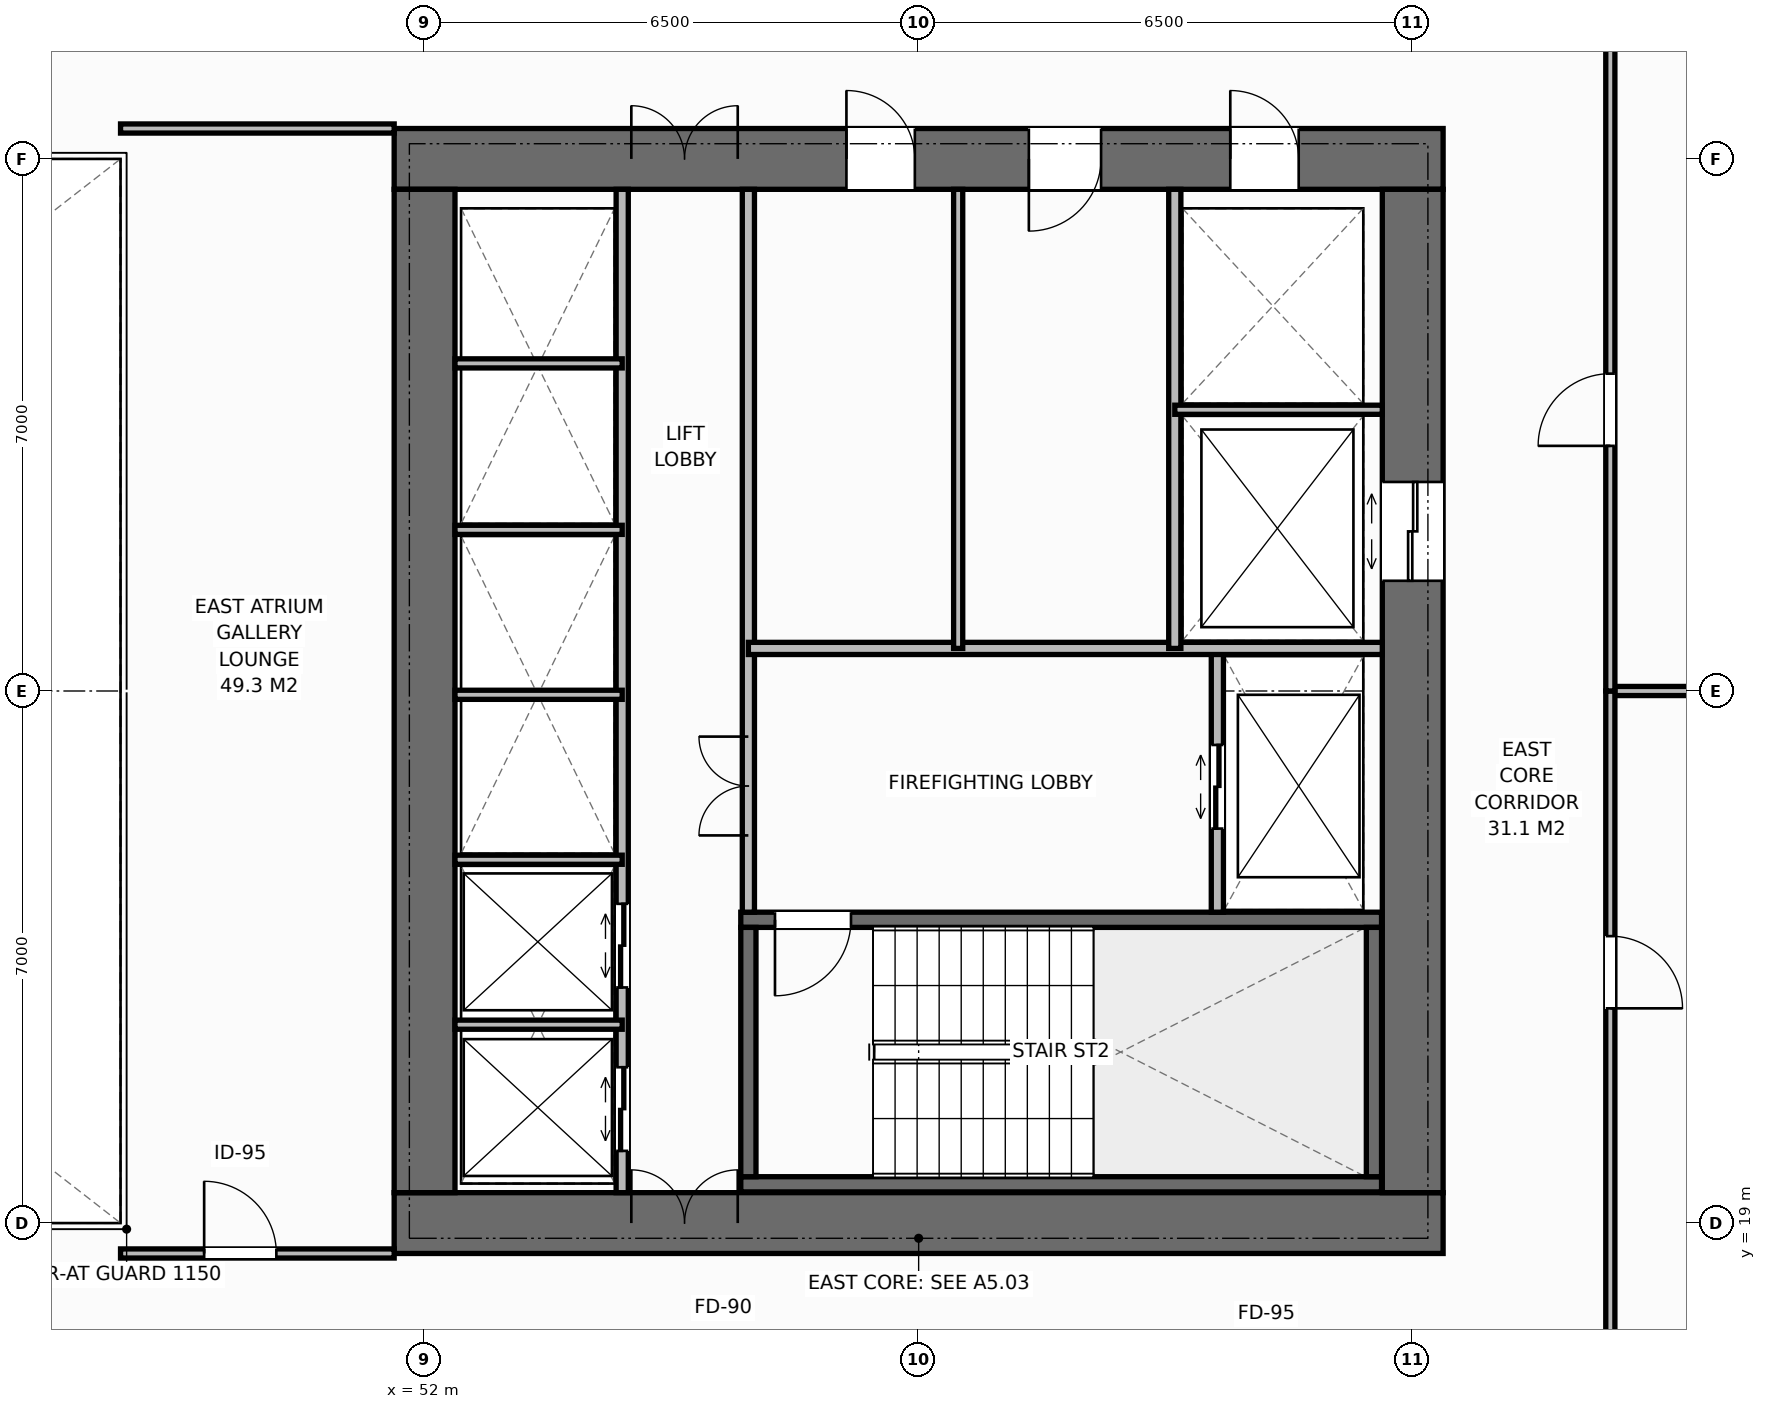
"""IFC4 building model, lengths in metres.
Left out: names, types, materials, properties, quantities, classifications, styles, units other than length and angle.
Written with IfcOpenShell. Run it as: python <this file> out.ifc"""

import sys

from ifc_helpers import new_model, si_unit, direction, frame, frame_2d, origin, place, context, subcontext, project, spatial, rectangle, extrude, element, fill, save


model = new_model("IFC4")
c1 = context("Model", 3, precision=1e-05, world=origin(), true_north=direction((0.0, 1.0)))
c2 = subcontext(c1, "Body", "Model", "MODEL_VIEW")
j1 = project(units=[si_unit("LENGTHUNIT", "METRE"), si_unit("PLANEANGLEUNIT", "RADIAN")], contexts=[c1])
p1 = place(None, origin())
s1 = spatial("IfcSite", under=j1, at=p1, CompositionType="ELEMENT")
p2 = place(p1, origin())
s2 = spatial("IfcBuilding", under=s1, at=p2, CompositionType="ELEMENT")
p3 = place(p2, frame((0.0, 0.0, 69.6)))
s3 = spatial("IfcBuildingStorey", under=s2, at=p3, CompositionType="ELEMENT", Elevation=69.6)
p4 = place(p3, frame((51.6, 19.0, 0.0), z_axis=(0.0, 0.0, 1.0), x_axis=(1.0, 0.0, 0.0)))
e1 = element("IfcWall", 1, at=p4, inside=s3, PredefinedType="SHEAR", context=c2, shape_type="SweptSolid", body=[
    extrude(rectangle(XDim=13.8, YDim=0.8, at=frame_2d((6.9, 0.0))), origin(), (0.0, 0.0, 1.0), 3.8),
])
p5 = place(p4, frame((3.12, 0.0, 0.0)))
e2 = element("IfcOpeningElement", 2, at=p5, cuts=e1, PredefinedType="OPENING", context=c2, shape_type="SweptSolid", body=[
    extrude(rectangle(XDim=1.4, YDim=2.2, at=frame_2d((0.7, 1.1))), frame((0.0, 0.41, 0.0), z_axis=(0.0, -1.0, 0.0), x_axis=(1.0, 0.0, 0.0)), (0.0, 0.0, 1.0), 0.82),
])
p6 = place(p3, frame((51.6, 33.0, 0.0), z_axis=(0.0, 0.0, 1.0), x_axis=(1.0, 0.0, 0.0)))
e3 = element("IfcWall", 3, at=p6, inside=s3, PredefinedType="SHEAR", context=c2, shape_type="SweptSolid", body=[
    extrude(rectangle(XDim=13.8, YDim=0.8, at=frame_2d((6.9, 0.0))), origin(), (0.0, 0.0, 1.0), 3.8),
])
p7 = place(p6, frame((3.12, 0.0, 0.0)))
e4 = element("IfcOpeningElement", 4, at=p7, cuts=e3, PredefinedType="OPENING", context=c2, shape_type="SweptSolid", body=[
    extrude(rectangle(XDim=1.4, YDim=2.2, at=frame_2d((0.7, 1.1))), frame((0.0, 0.41, 0.0), z_axis=(0.0, -1.0, 0.0), x_axis=(1.0, 0.0, 0.0)), (0.0, 0.0, 1.0), 0.82),
])
p8 = place(p6, frame((11.0, 0.0, 0.0)))
e5 = element("IfcOpeningElement", 5, at=p8, cuts=e3, PredefinedType="OPENING", context=c2, shape_type="SweptSolid", body=[
    extrude(rectangle(XDim=0.9, YDim=2.15, at=frame_2d((0.45, 1.075))), frame((0.0, 0.41, 0.0), z_axis=(0.0, -1.0, 0.0), x_axis=(1.0, 0.0, 0.0)), (0.0, 0.0, 1.0), 0.82),
])
p9 = place(p6, frame((5.95, 0.0, 0.0)))
e6 = element("IfcOpeningElement", 6, at=p9, cuts=e3, PredefinedType="OPENING", context=c2, shape_type="SweptSolid", body=[
    extrude(rectangle(XDim=0.9, YDim=2.15, at=frame_2d((0.45, 1.075))), frame((0.0, 0.41, 0.0), z_axis=(0.0, -1.0, 0.0), x_axis=(1.0, 0.0, 0.0)), (0.0, 0.0, 1.0), 0.82),
])
p10 = place(p6, frame((8.35, 0.0, 0.0)))
e7 = element("IfcOpeningElement", 7, at=p10, cuts=e3, PredefinedType="OPENING", context=c2, shape_type="SweptSolid", body=[
    extrude(rectangle(XDim=0.95, YDim=2.15, at=frame_2d((0.475, 1.075))), frame((0.0, 0.41, 0.0), z_axis=(0.0, -1.0, 0.0), x_axis=(1.0, 0.0, 0.0)), (0.0, 0.0, 1.0), 0.82),
])
p11 = place(p3, frame((52.0, 19.4, 0.0), z_axis=(0.0, 0.0, 1.0), x_axis=(0.0, 1.0, 0.0)))
e8 = element("IfcWall", 8, at=p11, inside=s3, PredefinedType="SHEAR", context=c2, shape_type="SweptSolid", body=[
    extrude(rectangle(XDim=13.2, YDim=0.8, at=frame_2d((6.6, 0.0))), origin(), (0.0, 0.0, 1.0), 3.8),
])
p12 = place(p3, frame((65.0, 19.4, 0.0), z_axis=(0.0, 0.0, 1.0), x_axis=(0.0, 1.0, 0.0)))
e9 = element("IfcWall", 9, at=p12, inside=s3, PredefinedType="SHEAR", context=c2, shape_type="SweptSolid", body=[
    extrude(rectangle(XDim=13.2, YDim=0.8, at=frame_2d((6.6, 0.0))), origin(), (0.0, 0.0, 1.0), 3.8),
])
p13 = place(p12, frame((8.05, 0.0, 0.0)))
e10 = element("IfcOpeningElement", 10, at=p13, cuts=e9, PredefinedType="OPENING", context=c2, shape_type="SweptSolid", body=[
    extrude(rectangle(XDim=1.3, YDim=2.2, at=frame_2d((0.65, 1.1))), frame((0.0, 0.41, 0.0), z_axis=(0.0, -1.0, 0.0), x_axis=(1.0, 0.0, 0.0)), (0.0, 0.0, 1.0), 0.82),
])
p14 = place(p3, frame((56.16, 19.51, 0.0), z_axis=(0.0, 0.0, 1.0), x_axis=(1.0, 0.0, 0.0)))
e11 = element("IfcWall", 11, at=p14, inside=s3, PredefinedType="SHEAR", context=c2, shape_type="SweptSolid", body=[
    extrude(rectangle(XDim=8.43, YDim=0.2, at=frame_2d((4.215, 0.0))), origin(), (0.0, 0.0, 1.0), 3.8),
])
p15 = place(p3, frame((56.16, 22.99, 0.0), z_axis=(0.0, 0.0, 1.0), x_axis=(1.0, 0.0, 0.0)))
e12 = element("IfcWall", 12, at=p15, inside=s3, PredefinedType="SHEAR", context=c2, shape_type="SweptSolid", body=[
    extrude(rectangle(XDim=8.43, YDim=0.2, at=frame_2d((4.215, 0.0))), origin(), (0.0, 0.0, 1.0), 3.8),
])
p16 = place(p15, frame((0.45, 0.0, 0.0)))
e13 = element("IfcOpeningElement", 13, at=p16, cuts=e12, PredefinedType="OPENING", context=c2, shape_type="SweptSolid", body=[
    extrude(rectangle(XDim=1.0, YDim=2.15, at=frame_2d((0.5, 1.075))), frame((0.0, 0.11, 0.0), z_axis=(0.0, -1.0, 0.0), x_axis=(1.0, 0.0, 0.0)), (0.0, 0.0, 1.0), 0.22),
])
for number, where, z_axis, x_axis in (
    (14, (56.26, 19.61, 0.0), (0.0, 0.0, 1.0), (0.0, 1.0, 0.0)),
    (15, (64.49, 19.61, 0.0), (0.0, 0.0, 1.0), (0.0, 1.0, 0.0)),
):
    element("IfcWall", number, at=place(p3, frame(where, z_axis=z_axis, x_axis=x_axis)), inside=s3, PredefinedType="SHEAR", context=c2, shape_type="SweptSolid", body=[
        extrude(rectangle(XDim=3.28, YDim=0.2, at=frame_2d((1.64, 0.0))), origin(), (0.0, 0.0, 1.0), 3.8),
    ])
p17 = place(p3, frame((54.6, 19.4, 0.0), z_axis=(0.0, 0.0, 1.0), x_axis=(0.0, 1.0, 0.0)))
e16 = element("IfcWall", 16, at=p17, inside=s3, PredefinedType="STANDARD", context=c2, shape_type="SweptSolid", body=[
    extrude(rectangle(XDim=13.2, YDim=0.16, at=frame_2d((6.6, 0.0))), origin(), (0.0, 0.0, 1.0), 3.55),
])
p18 = place(p17, frame((0.55, 0.0, 0.0)))
e17 = element("IfcOpeningElement", 17, at=p18, cuts=e16, PredefinedType="OPENING", context=c2, shape_type="SweptSolid", body=[
    extrude(rectangle(XDim=1.1, YDim=2.2, at=frame_2d((0.55, 1.1))), frame((0.0, 0.09, 0.0), z_axis=(0.0, -1.0, 0.0), x_axis=(1.0, 0.0, 0.0)), (0.0, 0.0, 1.0), 0.18),
])
p19 = place(p17, frame((2.7, 0.0, 0.0)))
e18 = element("IfcOpeningElement", 18, at=p19, cuts=e16, PredefinedType="OPENING", context=c2, shape_type="SweptSolid", body=[
    extrude(rectangle(XDim=1.1, YDim=2.2, at=frame_2d((0.55, 1.1))), frame((0.0, 0.09, 0.0), z_axis=(0.0, -1.0, 0.0), x_axis=(1.0, 0.0, 0.0)), (0.0, 0.0, 1.0), 0.18),
])
p20 = place(p3, frame((56.26, 23.09, 0.0), z_axis=(0.0, 0.0, 1.0), x_axis=(0.0, 1.0, 0.0)))
e19 = element("IfcWall", 19, at=p20, inside=s3, PredefinedType="STANDARD", context=c2, shape_type="SweptSolid", body=[
    extrude(rectangle(XDim=9.51, YDim=0.16, at=frame_2d((4.755, 0.0))), origin(), (0.0, 0.0, 1.0), 3.55),
])
p21 = place(p20, frame((1.01, 0.0, 0.0)))
e20 = element("IfcOpeningElement", 20, at=p21, cuts=e19, PredefinedType="OPENING", context=c2, shape_type="SweptSolid", body=[
    extrude(rectangle(XDim=1.3, YDim=2.2, at=frame_2d((0.65, 1.1))), frame((0.0, 0.09, 0.0), z_axis=(0.0, -1.0, 0.0), x_axis=(1.0, 0.0, 0.0)), (0.0, 0.0, 1.0), 0.18),
])
for number, where, z_axis, x_axis in (
    (21, (52.4, 21.61, 0.0), (0.0, 0.0, 1.0), (1.0, 0.0, 0.0)),
    (22, (52.4, 23.78, 0.0), (0.0, 0.0, 1.0), (1.0, 0.0, 0.0)),
    (23, (52.4, 25.95, 0.0), (0.0, 0.0, 1.0), (1.0, 0.0, 0.0)),
    (24, (52.4, 28.12, 0.0), (0.0, 0.0, 1.0), (1.0, 0.0, 0.0)),
    (25, (52.4, 30.31, 0.0), (0.0, 0.0, 1.0), (1.0, 0.0, 0.0)),
):
    element("IfcWall", number, at=place(p3, frame(where, z_axis=z_axis, x_axis=x_axis)), inside=s3, PredefinedType="PARTITIONING", context=c2, shape_type="SweptSolid", body=[
        extrude(rectangle(XDim=2.2, YDim=0.12, at=frame_2d((1.1, 0.0))), origin(), (0.0, 0.0, 1.0), 3.55),
    ])
p22 = place(p3, frame((62.43, 23.09, 0.0), z_axis=(0.0, 0.0, 1.0), x_axis=(0.0, 1.0, 0.0)))
e26 = element("IfcWall", 26, at=p22, inside=s3, PredefinedType="STANDARD", context=c2, shape_type="SweptSolid", body=[
    extrude(rectangle(XDim=3.47, YDim=0.16, at=frame_2d((1.735, 0.0))), origin(), (0.0, 0.0, 1.0), 3.55),
])
p23 = place(p22, frame((1.1, 0.0, 0.0)))
e27 = element("IfcOpeningElement", 27, at=p23, cuts=e26, PredefinedType="OPENING", context=c2, shape_type="SweptSolid", body=[
    extrude(rectangle(XDim=1.1, YDim=2.2, at=frame_2d((0.55, 1.1))), frame((0.0, 0.09, 0.0), z_axis=(0.0, -1.0, 0.0), x_axis=(1.0, 0.0, 0.0)), (0.0, 0.0, 1.0), 0.18),
])
p24 = place(p3, frame((56.26, 26.56, 0.0), z_axis=(0.0, 0.0, 1.0), x_axis=(1.0, 0.0, 0.0)))
e28 = element("IfcWall", 28, at=p24, inside=s3, PredefinedType="STANDARD", context=c2, shape_type="SweptSolid", body=[
    extrude(rectangle(XDim=8.34, YDim=0.16, at=frame_2d((4.17, 0.0))), origin(), (0.0, 0.0, 1.0), 3.55),
])
p25 = place(p3, frame((61.87, 26.56, 0.0), z_axis=(0.0, 0.0, 1.0), x_axis=(0.0, 1.0, 0.0)))
e29 = element("IfcWall", 29, at=p25, inside=s3, PredefinedType="STANDARD", context=c2, shape_type="SweptSolid", body=[
    extrude(rectangle(XDim=6.04, YDim=0.16, at=frame_2d((3.02, 0.0))), origin(), (0.0, 0.0, 1.0), 3.55),
])
p26 = place(p3, frame((61.87, 29.7, 0.0), z_axis=(0.0, 0.0, 1.0), x_axis=(1.0, 0.0, 0.0)))
e30 = element("IfcWall", 30, at=p26, inside=s3, PredefinedType="PARTITIONING", context=c2, shape_type="SweptSolid", body=[
    extrude(rectangle(XDim=2.73, YDim=0.12, at=frame_2d((1.365, 0.0))), origin(), (0.0, 0.0, 1.0), 3.55),
])
p27 = place(p3, frame((59.02, 26.56, 0.0), z_axis=(0.0, 0.0, 1.0), x_axis=(0.0, 1.0, 0.0)))
e31 = element("IfcWall", 31, at=p27, inside=s3, PredefinedType="PARTITIONING", context=c2, shape_type="SweptSolid", body=[
    extrude(rectangle(XDim=6.04, YDim=0.12, at=frame_2d((3.02, 0.0))), origin(), (0.0, 0.0, 1.0), 3.55),
])
p28 = place(p3, frame((48.0, 33.4, 0.0), z_axis=(0.0, 0.0, 1.0), x_axis=(1.0, 0.0, 0.0)))
e32 = element("IfcWall", 32, at=p28, inside=s3, PredefinedType="PARTITIONING", context=c2, shape_type="SweptSolid", body=[
    extrude(rectangle(XDim=3.6, YDim=0.12, at=frame_2d((1.8, 0.0))), origin(), (0.0, 0.0, 1.0), 3.55),
])
p29 = place(p3, frame((48.0, 18.6, 0.0), z_axis=(0.0, 0.0, 1.0), x_axis=(1.0, 0.0, 0.0)))
e33 = element("IfcWall", 33, at=p29, inside=s3, PredefinedType="PARTITIONING", context=c2, shape_type="SweptSolid", body=[
    extrude(rectangle(XDim=3.6, YDim=0.12, at=frame_2d((1.8, 0.0))), origin(), (0.0, 0.0, 1.0), 3.55),
])
p30 = place(p29, frame((1.1, 0.0, 0.0)))
e34 = element("IfcOpeningElement", 34, at=p30, cuts=e33, PredefinedType="OPENING", context=c2, shape_type="SweptSolid", body=[
    extrude(rectangle(XDim=0.95, YDim=2.15, at=frame_2d((0.475, 1.075))), frame((0.0, 0.07, 0.0), z_axis=(0.0, -1.0, 0.0), x_axis=(1.0, 0.0, 0.0)), (0.0, 0.0, 1.0), 0.14),
])
p31 = place(p3, frame((67.6, 26.0, 0.0), z_axis=(0.0, 0.0, 1.0), x_axis=(1.0, 0.0, 0.0)))
e35 = element("IfcWall", 35, at=p31, inside=s3, PredefinedType="PARTITIONING", context=c2, shape_type="SweptSolid", body=[
    extrude(rectangle(XDim=10.58, YDim=0.12, at=frame_2d((5.29, 0.0))), origin(), (0.0, 0.0, 1.0), 3.55),
])
p32 = place(p3, frame((67.6, 16.5, 0.0), z_axis=(0.0, 0.0, 1.0), x_axis=(0.0, 1.0, 0.0)))
e36 = element("IfcWall", 36, at=p32, inside=s3, PredefinedType="PARTITIONING", context=c2, shape_type="SweptSolid", body=[
    extrude(rectangle(XDim=9.5, YDim=0.12, at=frame_2d((4.75, 0.0))), origin(), (0.0, 0.0, 1.0), 3.55),
])
p33 = place(p32, frame((5.325, 0.0, 0.0)))
e37 = element("IfcOpeningElement", 37, at=p33, cuts=e36, PredefinedType="OPENING", context=c2, shape_type="SweptSolid", body=[
    extrude(rectangle(XDim=0.95, YDim=2.15, at=frame_2d((0.475, 1.075))), frame((0.0, 0.07, 0.0), z_axis=(0.0, -1.0, 0.0), x_axis=(1.0, 0.0, 0.0)), (0.0, 0.0, 1.0), 0.14),
])
p34 = place(p3, frame((67.6, 26.0, 0.0), z_axis=(0.0, 0.0, 1.0), x_axis=(0.0, 1.0, 0.0)))
e38 = element("IfcWall", 38, at=p34, inside=s3, PredefinedType="PARTITIONING", context=c2, shape_type="SweptSolid", body=[
    extrude(rectangle(XDim=9.5, YDim=0.12, at=frame_2d((4.75, 0.0))), origin(), (0.0, 0.0, 1.0), 3.55),
])
p35 = place(p34, frame((3.225, 0.0, 0.0)))
e39 = element("IfcOpeningElement", 39, at=p35, cuts=e38, PredefinedType="OPENING", context=c2, shape_type="SweptSolid", body=[
    extrude(rectangle(XDim=0.95, YDim=2.15, at=frame_2d((0.475, 1.075))), frame((0.0, 0.07, 0.0), z_axis=(0.0, -1.0, 0.0), x_axis=(1.0, 0.0, 0.0)), (0.0, 0.0, 1.0), 0.14),
])
p36 = place(p5, origin())
e40 = element("IfcDoor", 40, at=p36, inside=s3, OperationType="DOUBLE_DOOR_SINGLE_SWING", PredefinedType="DOOR", context=c2, shape_type="SweptSolid", body=[
    extrude(rectangle(XDim=1.4, YDim=2.2, at=frame_2d((0.7, 1.1))), frame((0.0, 0.125, 0.0), z_axis=(0.0, -1.0, 0.0), x_axis=(1.0, 0.0, 0.0)), (0.0, 0.0, 1.0), 0.05),
])
fill(e2, e40)
p37 = place(p7, origin())
e41 = element("IfcDoor", 41, at=p37, inside=s3, OperationType="DOUBLE_DOOR_SINGLE_SWING", PredefinedType="DOOR", context=c2, shape_type="SweptSolid", body=[
    extrude(rectangle(XDim=1.4, YDim=2.2, at=frame_2d((0.7, 1.1))), frame((0.0, -0.075, 0.0), z_axis=(0.0, -1.0, 0.0), x_axis=(1.0, 0.0, 0.0)), (0.0, 0.0, 1.0), 0.05),
])
fill(e4, e41)
p38 = place(p18, origin())
e42 = element("IfcDoor", 42, at=p38, inside=s3, OperationType="DOUBLE_DOOR_SLIDING", PredefinedType="DOOR", context=c2, shape_type="SweptSolid", body=[
    extrude(rectangle(XDim=1.1, YDim=2.2, at=frame_2d((0.55, 1.1))), frame((0.0, 0.025, 0.0), z_axis=(0.0, -1.0, 0.0), x_axis=(1.0, 0.0, 0.0)), (0.0, 0.0, 1.0), 0.05),
])
fill(e17, e42)
p39 = place(p19, origin())
e43 = element("IfcDoor", 43, at=p39, inside=s3, OperationType="DOUBLE_DOOR_SLIDING", PredefinedType="DOOR", context=c2, shape_type="SweptSolid", body=[
    extrude(rectangle(XDim=1.1, YDim=2.2, at=frame_2d((0.55, 1.1))), frame((0.0, 0.025, 0.0), z_axis=(0.0, -1.0, 0.0), x_axis=(1.0, 0.0, 0.0)), (0.0, 0.0, 1.0), 0.05),
])
fill(e18, e43)
p40 = place(p16, origin())
e44 = element("IfcDoor", 44, at=p40, inside=s3, OperationType="SINGLE_SWING_RIGHT", PredefinedType="DOOR", context=c2, shape_type="SweptSolid", body=[
    extrude(rectangle(XDim=1.0, YDim=2.15, at=frame_2d((0.5, 1.075))), frame((0.0, 0.025, 0.0), z_axis=(0.0, -1.0, 0.0), x_axis=(1.0, 0.0, 0.0)), (0.0, 0.0, 1.0), 0.05),
])
fill(e13, e44)
p41 = place(p23, origin())
e45 = element("IfcDoor", 45, at=p41, inside=s3, OperationType="DOUBLE_DOOR_SLIDING", PredefinedType="DOOR", context=c2, shape_type="SweptSolid", body=[
    extrude(rectangle(XDim=1.1, YDim=2.2, at=frame_2d((0.55, 1.1))), frame((0.0, 0.025, 0.0), z_axis=(0.0, -1.0, 0.0), x_axis=(1.0, 0.0, 0.0)), (0.0, 0.0, 1.0), 0.05),
])
fill(e27, e45)
p42 = place(p21, origin())
e46 = element("IfcDoor", 46, at=p42, inside=s3, OperationType="DOUBLE_DOOR_SINGLE_SWING", PredefinedType="DOOR", context=c2, shape_type="SweptSolid", body=[
    extrude(rectangle(XDim=1.3, YDim=2.2, at=frame_2d((0.65, 1.1))), frame((0.0, 0.025, 0.0), z_axis=(0.0, -1.0, 0.0), x_axis=(1.0, 0.0, 0.0)), (0.0, 0.0, 1.0), 0.05),
])
fill(e20, e46)
p43 = place(p13, origin())
e47 = element("IfcDoor", 47, at=p43, inside=s3, OperationType="DOUBLE_DOOR_SLIDING", PredefinedType="DOOR", context=c2, shape_type="SweptSolid", body=[
    extrude(rectangle(XDim=1.3, YDim=2.2, at=frame_2d((0.65, 1.1))), frame((0.0, 0.025, 0.0), z_axis=(0.0, -1.0, 0.0), x_axis=(1.0, 0.0, 0.0)), (0.0, 0.0, 1.0), 0.05),
])
fill(e10, e47)
p44 = place(p8, origin())
e48 = element("IfcDoor", 48, at=p44, inside=s3, OperationType="SINGLE_SWING_LEFT", PredefinedType="DOOR", context=c2, shape_type="SweptSolid", body=[
    extrude(rectangle(XDim=0.9, YDim=2.15, at=frame_2d((0.45, 1.075))), frame((0.0, -0.075, 0.0), z_axis=(0.0, -1.0, 0.0), x_axis=(1.0, 0.0, 0.0)), (0.0, 0.0, 1.0), 0.05),
])
fill(e5, e48)
p45 = place(p9, origin())
e49 = element("IfcDoor", 49, at=p45, inside=s3, OperationType="SINGLE_SWING_LEFT", PredefinedType="DOOR", context=c2, shape_type="SweptSolid", body=[
    extrude(rectangle(XDim=0.9, YDim=2.15, at=frame_2d((0.45, 1.075))), frame((0.0, -0.075, 0.0), z_axis=(0.0, -1.0, 0.0), x_axis=(1.0, 0.0, 0.0)), (0.0, 0.0, 1.0), 0.05),
])
fill(e6, e49)
p46 = place(p10, origin())
e50 = element("IfcDoor", 50, at=p46, inside=s3, OperationType="SINGLE_SWING_RIGHT", PredefinedType="DOOR", context=c2, shape_type="SweptSolid", body=[
    extrude(rectangle(XDim=0.95, YDim=2.15, at=frame_2d((0.475, 1.075))), frame((0.0, -0.075, 0.0), z_axis=(0.0, -1.0, 0.0), x_axis=(1.0, 0.0, 0.0)), (0.0, 0.0, 1.0), 0.05),
])
fill(e7, e50)
p47 = place(p30, origin())
e51 = element("IfcDoor", 51, at=p47, inside=s3, OperationType="SINGLE_SWING_LEFT", PredefinedType="DOOR", context=c2, shape_type="SweptSolid", body=[
    extrude(rectangle(XDim=0.95, YDim=2.15, at=frame_2d((0.475, 1.075))), frame((0.0, 0.025, 0.0), z_axis=(0.0, -1.0, 0.0), x_axis=(1.0, 0.0, 0.0)), (0.0, 0.0, 1.0), 0.05),
])
fill(e34, e51)
p48 = place(p33, origin())
e52 = element("IfcDoor", 52, at=p48, inside=s3, OperationType="SINGLE_SWING_RIGHT", PredefinedType="DOOR", context=c2, shape_type="SweptSolid", body=[
    extrude(rectangle(XDim=0.95, YDim=2.15, at=frame_2d((0.475, 1.075))), frame((0.0, 0.025, 0.0), z_axis=(0.0, -1.0, 0.0), x_axis=(1.0, 0.0, 0.0)), (0.0, 0.0, 1.0), 0.05),
])
fill(e37, e52)
p49 = place(p35, origin())
e53 = element("IfcDoor", 53, at=p49, inside=s3, OperationType="SINGLE_SWING_LEFT", PredefinedType="DOOR", context=c2, shape_type="SweptSolid", body=[
    extrude(rectangle(XDim=0.95, YDim=2.15, at=frame_2d((0.475, 1.075))), frame((0.0, 0.025, 0.0), z_axis=(0.0, -1.0, 0.0), x_axis=(1.0, 0.0, 0.0)), (0.0, 0.0, 1.0), 0.05),
])
fill(e39, e53)
save(model, sys.argv[1])
